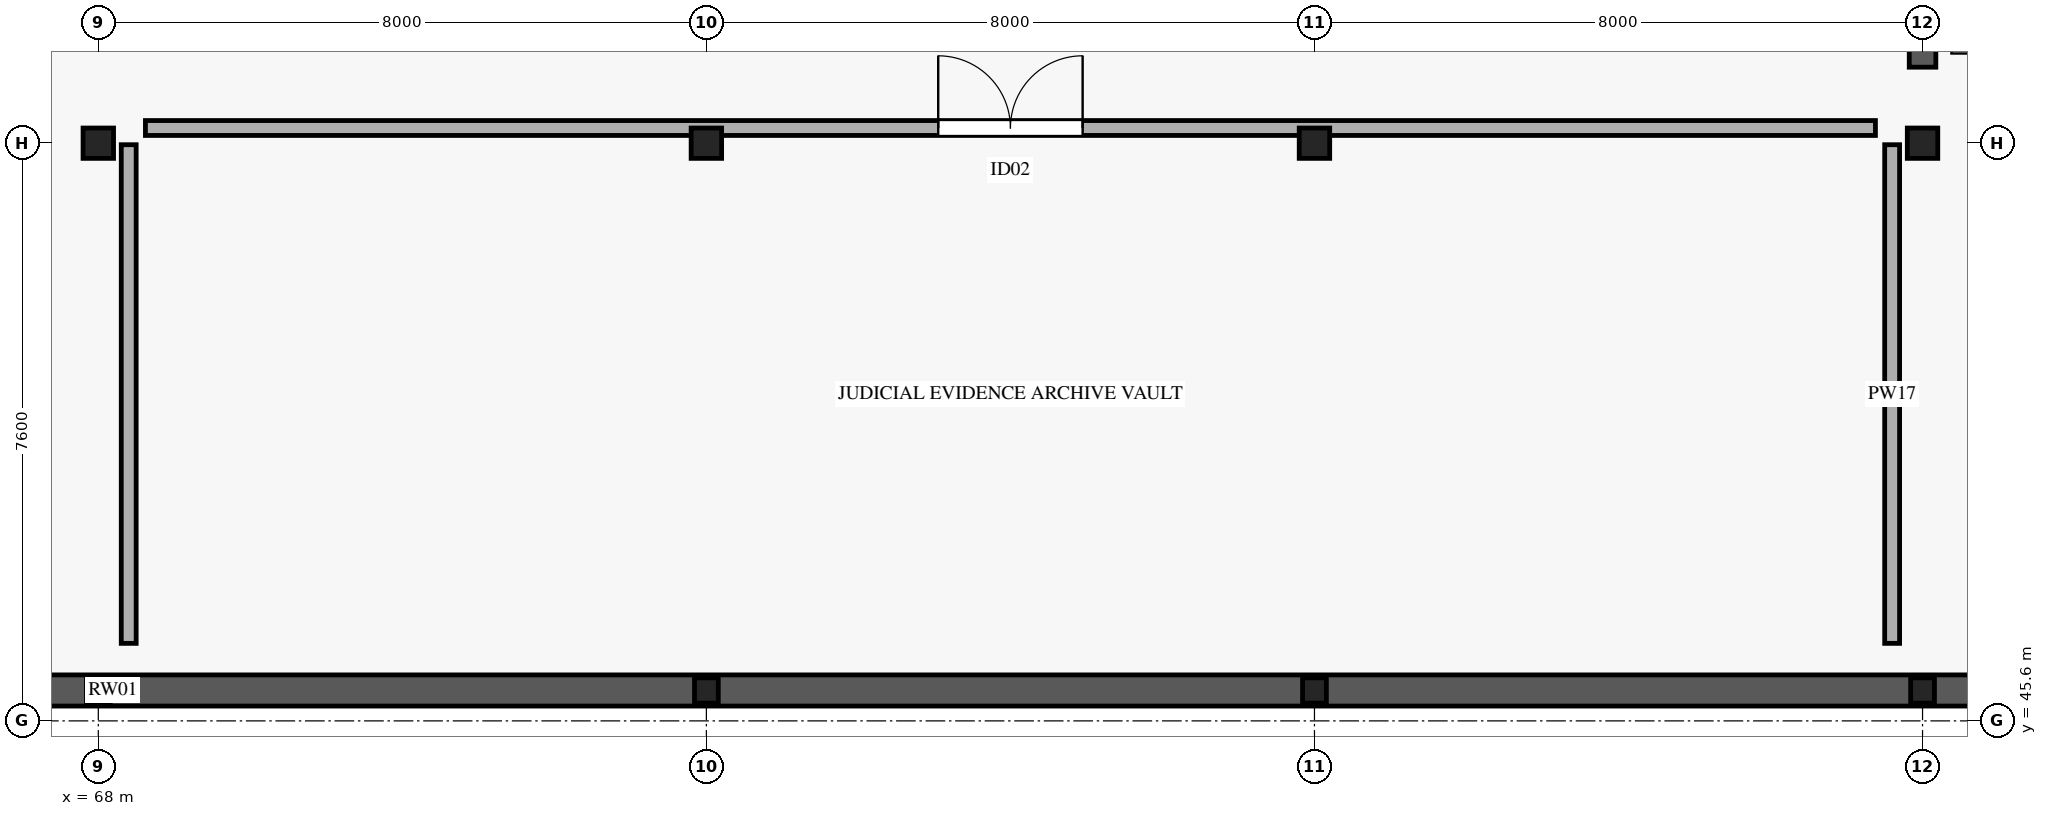
"""IFC4 building model, lengths in metres.
Left out: names, types, materials, properties, quantities, classifications, styles, units other than length and angle.
Written with IfcOpenShell. Run it as: python <this file> out.ifc"""

import sys

from ifc_helpers import new_model, si_unit, direction, frame, frame_2d, origin, origin_2d, place, context, subcontext, project, spatial, rectangle, i_section, extrude, element, fill, save


model = new_model("IFC4")
c1 = context("Model", 3, precision=1e-05, world=origin(), true_north=direction((0.0, 1.0)))
c2 = subcontext(c1, "Body", "Model", "MODEL_VIEW")
j1 = project(units=[si_unit("LENGTHUNIT", "METRE"), si_unit("PLANEANGLEUNIT", "RADIAN")], contexts=[c1])
p1 = place(None, origin())
s1 = spatial("IfcSite", under=j1, at=p1, CompositionType="ELEMENT")
p2 = place(p1, origin())
s2 = spatial("IfcBuilding", under=s1, at=p2, CompositionType="ELEMENT")
p3 = place(p2, frame((0.0, 0.0, -4.8)))
s3 = spatial("IfcBuildingStorey", under=s2, at=p3, CompositionType="ELEMENT", Elevation=-4.8)
p4 = place(p3, frame((68.0, 46.0, 0.0), z_axis=(0.0, 0.0, 1.0), x_axis=(1.0, 0.0, 0.0)))
e1 = element("IfcColumn", 1, at=p4, inside=s3, PredefinedType="COLUMN", context=c2, shape_type="SweptSolid", body=[
    extrude(i_section(OverallWidth=0.313, OverallDepth=0.333, WebThickness=0.018, FlangeThickness=0.028, FilletRadius=0.015, at=origin_2d()), origin(), (0.0, 0.0, 1.0), 4.58),
])
p5 = place(p3, frame((68.0, 53.2, 0.0), z_axis=(0.0, 0.0, 1.0), x_axis=(1.0, 0.0, 0.0)))
e2 = element("IfcColumn", 2, at=p5, inside=s3, PredefinedType="COLUMN", context=c2, shape_type="SweptSolid", body=[
    extrude(i_section(OverallWidth=0.401, OverallDepth=0.399, WebThickness=0.025, FlangeThickness=0.04, FilletRadius=0.015, at=origin_2d()), origin(), (0.0, 0.0, 1.0), 4.58),
])
p6 = place(p3, frame((76.0, 46.0, 0.0), z_axis=(0.0, 0.0, 1.0), x_axis=(1.0, 0.0, 0.0)))
e3 = element("IfcColumn", 3, at=p6, inside=s3, PredefinedType="COLUMN", context=c2, shape_type="SweptSolid", body=[
    extrude(i_section(OverallWidth=0.313, OverallDepth=0.333, WebThickness=0.018, FlangeThickness=0.028, FilletRadius=0.015, at=origin_2d()), origin(), (0.0, 0.0, 1.0), 4.58),
])
p7 = place(p3, frame((76.0, 53.2, 0.0), z_axis=(0.0, 0.0, 1.0), x_axis=(1.0, 0.0, 0.0)))
e4 = element("IfcColumn", 4, at=p7, inside=s3, PredefinedType="COLUMN", context=c2, shape_type="SweptSolid", body=[
    extrude(i_section(OverallWidth=0.401, OverallDepth=0.399, WebThickness=0.025, FlangeThickness=0.04, FilletRadius=0.015, at=origin_2d()), origin(), (0.0, 0.0, 1.0), 4.58),
])
p8 = place(p3, frame((84.0, 46.0, 0.0), z_axis=(0.0, 0.0, 1.0), x_axis=(1.0, 0.0, 0.0)))
e5 = element("IfcColumn", 5, at=p8, inside=s3, PredefinedType="COLUMN", context=c2, shape_type="SweptSolid", body=[
    extrude(i_section(OverallWidth=0.313, OverallDepth=0.333, WebThickness=0.018, FlangeThickness=0.028, FilletRadius=0.015, at=origin_2d()), origin(), (0.0, 0.0, 1.0), 4.58),
])
p9 = place(p3, frame((84.0, 53.2, 0.0), z_axis=(0.0, 0.0, 1.0), x_axis=(1.0, 0.0, 0.0)))
e6 = element("IfcColumn", 6, at=p9, inside=s3, PredefinedType="COLUMN", context=c2, shape_type="SweptSolid", body=[
    extrude(i_section(OverallWidth=0.401, OverallDepth=0.399, WebThickness=0.025, FlangeThickness=0.04, FilletRadius=0.015, at=origin_2d()), origin(), (0.0, 0.0, 1.0), 4.58),
])
p10 = place(p3, frame((92.0, 46.0, 0.0), z_axis=(0.0, 0.0, 1.0), x_axis=(1.0, 0.0, 0.0)))
e7 = element("IfcColumn", 7, at=p10, inside=s3, PredefinedType="COLUMN", context=c2, shape_type="SweptSolid", body=[
    extrude(i_section(OverallWidth=0.313, OverallDepth=0.333, WebThickness=0.018, FlangeThickness=0.028, FilletRadius=0.015, at=origin_2d()), origin(), (0.0, 0.0, 1.0), 4.58),
])
p11 = place(p3, frame((92.0, 53.2, 0.0), z_axis=(0.0, 0.0, 1.0), x_axis=(1.0, 0.0, 0.0)))
e8 = element("IfcColumn", 8, at=p11, inside=s3, PredefinedType="COLUMN", context=c2, shape_type="SweptSolid", body=[
    extrude(i_section(OverallWidth=0.401, OverallDepth=0.399, WebThickness=0.025, FlangeThickness=0.04, FilletRadius=0.015, at=origin_2d()), origin(), (0.0, 0.0, 1.0), 4.58),
])
p12 = place(p3, frame((28.18, 46.0, 0.0), z_axis=(0.0, 0.0, 1.0), x_axis=(1.0, 0.0, 0.0)))
e9 = element("IfcWall", 9, at=p12, inside=s3, PredefinedType="USERDEFINED", context=c2, shape_type="SweptSolid", body=[
    extrude(rectangle(XDim=80.025, YDim=0.41, at=frame_2d((40.013, 0.0))), origin(), (0.0, 0.0, 1.0), 4.58),
])
p13 = place(p3, frame((92.0, 54.2, 0.0), z_axis=(0.0, 0.0, 1.0), x_axis=(0.0, 1.0, 0.0)))
e10 = element("IfcWall", 10, at=p13, inside=s3, PredefinedType="SHEAR", context=c2, shape_type="SweptSolid", body=[
    extrude(rectangle(XDim=5.82, YDim=0.35, at=frame_2d((2.91, 0.0))), origin(), (0.0, 0.0, 1.0), 4.58),
])
p14 = place(p3, frame((68.62, 53.4, 0.0), z_axis=(0.0, 0.0, 1.0), x_axis=(1.0, 0.0, 0.0)))
e11 = element("IfcWall", 11, at=p14, inside=s3, PredefinedType="PARTITIONING", context=c2, shape_type="SweptSolid", body=[
    extrude(rectangle(XDim=22.76, YDim=0.196, at=frame_2d((11.38, 0.0))), origin(), (0.0, 0.0, 1.0), 3.45),
])
p15 = place(p14, frame((10.43, 0.0, 0.0)))
e12 = element("IfcOpeningElement", 12, at=p15, cuts=e11, PredefinedType="OPENING", context=c2, shape_type="SweptSolid", body=[
    extrude(rectangle(XDim=1.9, YDim=2.4, at=frame_2d((0.95, 1.2))), frame((0.0, 0.108, 0.0), z_axis=(0.0, -1.0, 0.0), x_axis=(1.0, 0.0, 0.0)), (0.0, 0.0, 1.0), 0.216),
])
for number, where, z_axis, x_axis in (
    (13, (91.6, 46.62, 0.0), (0.0, 0.0, 1.0), (0.0, 1.0, 0.0)),
    (14, (68.4, 46.62, 0.0), (0.0, 0.0, 1.0), (0.0, 1.0, 0.0)),
):
    element("IfcWall", number, at=place(p3, frame(where, z_axis=z_axis, x_axis=x_axis)), inside=s3, PredefinedType="PARTITIONING", context=c2, shape_type="SweptSolid", body=[
        extrude(rectangle(XDim=6.56, YDim=0.196, at=frame_2d((3.28, 0.0))), origin(), (0.0, 0.0, 1.0), 3.45),
    ])
p16 = place(p15, origin())
e15 = element("IfcDoor", 15, at=p16, inside=s3, OperationType="DOUBLE_DOOR_SINGLE_SWING", PredefinedType="DOOR", context=c2, shape_type="SweptSolid", body=[
    extrude(rectangle(XDim=1.9, YDim=2.4, at=frame_2d((0.95, 1.2))), frame((0.0, 0.025, 0.0), z_axis=(0.0, -1.0, 0.0), x_axis=(1.0, 0.0, 0.0)), (0.0, 0.0, 1.0), 0.05),
])
fill(e12, e15)
save(model, sys.argv[1])
